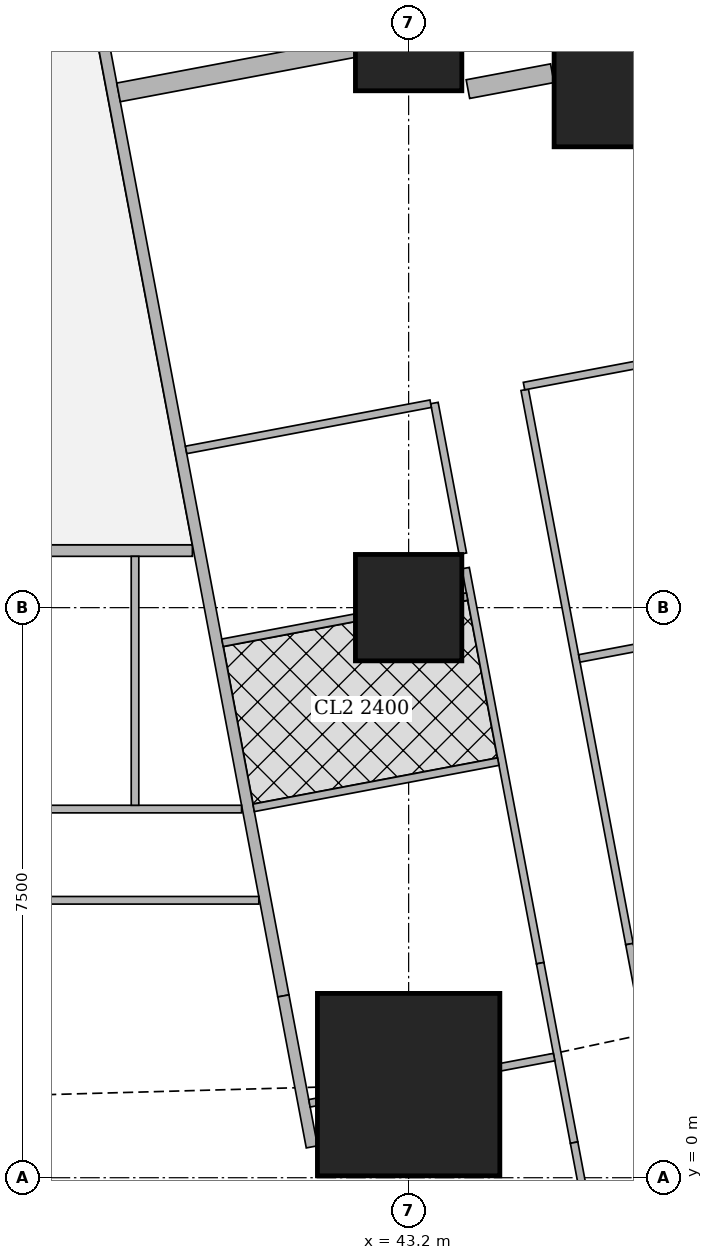
"""IFC4 building model, lengths in metres.
Left out: names, types, materials, properties, quantities, classifications, styles, units other than length and angle.
Written with IfcOpenShell. Run it as: python <this file> out.ifc"""

import sys

from ifc_helpers import new_model, si_unit, direction, frame, frame_2d, origin, origin_2d, place, context, subcontext, project, spatial, rectangle, extrude, element, fill, save


model = new_model("IFC4")
c1 = context("Model", 3, precision=1e-05, world=origin(), true_north=direction((0.0, 1.0)))
c2 = subcontext(c1, "Body", "Model", "MODEL_VIEW")
j1 = project(units=[si_unit("LENGTHUNIT", "METRE"), si_unit("PLANEANGLEUNIT", "RADIAN")], contexts=[c1])
p1 = place(None, origin())
s1 = spatial("IfcSite", under=j1, at=p1, CompositionType="ELEMENT")
p2 = place(p1, origin())
s2 = spatial("IfcBuilding", under=s1, at=p2, CompositionType="ELEMENT")
p3 = place(p2, frame((0.0, 0.0, 234.95)))
s3 = spatial("IfcBuildingStorey", under=s2, at=p3, CompositionType="ELEMENT", Elevation=234.95)
p4 = place(p3, frame((43.2, 1.225, 0.0), z_axis=(0.0, 0.0, 1.0), x_axis=(1.0, 0.0, 0.0)))
e1 = element("IfcColumn", 1, at=p4, inside=s3, PredefinedType="COLUMN", context=c2, shape_type="SweptSolid", body=[
    extrude(rectangle(XDim=2.4, YDim=2.4, at=origin_2d()), origin(), (0.0, 0.0, 1.0), 3.75),
])
for number, where, z_axis, x_axis in (
    (2, (43.2, 7.5, 0.0), (0.0, 0.0, 1.0), (1.0, 0.0, 0.0)),
    (3, (43.2, 15.0, 0.0), (0.0, 0.0, 1.0), (1.0, 0.0, 0.0)),
):
    element("IfcColumn", number, at=place(p3, frame(where, z_axis=z_axis, x_axis=x_axis)), inside=s3, PredefinedType="COLUMN", context=c2, shape_type="SweptSolid", body=[
        extrude(rectangle(XDim=1.4, YDim=1.4, at=origin_2d()), origin(), (0.0, 0.0, 1.0), 3.75),
    ])
p5 = place(p3, frame((46.314, 14.763, 0.0), z_axis=(0.0, 0.0, 1.0), x_axis=(1.0, 0.0, 0.0)))
e4 = element("IfcColumn", 4, at=p5, inside=s3, PredefinedType="COLUMN", context=c2, shape_type="SweptSolid", body=[
    extrude(rectangle(XDim=2.4, YDim=2.4, at=origin_2d()), origin(), (0.0, 0.0, 1.0), 3.75),
])
p6 = place(p3, frame((50.653, 2.703, 0.0), z_axis=(0.0, 0.0, 1.0), x_axis=(-0.185612026696, 0.982623109613, 0.0)))
e5 = element("IfcWall", 5, at=p6, inside=s3, PredefinedType="SOLIDWALL", context=c2, shape_type="SweptSolid", body=[
    extrude(rectangle(XDim=41.393, YDim=0.2, at=frame_2d((20.697, 0.0))), origin(), (0.0, 0.0, 1.0), 3.5),
])
p7 = place(p6, frame((1.633, 0.0, 0.9)))
e6 = element("IfcOpeningElement", 6, at=p7, cuts=e5, PredefinedType="OPENING", context=c2, shape_type="SweptSolid", body=[
    extrude(rectangle(XDim=1.8, YDim=1.5, at=frame_2d((0.9, 0.75))), frame((0.0, 0.11, 0.0), z_axis=(0.0, -1.0, 0.0), x_axis=(1.0, 0.0, 0.0)), (0.0, 0.0, 1.0), 0.22),
])
p8 = place(p6, frame((6.032, 0.0, 0.9)))
e7 = element("IfcOpeningElement", 7, at=p8, cuts=e5, PredefinedType="OPENING", context=c2, shape_type="SweptSolid", body=[
    extrude(rectangle(XDim=1.8, YDim=1.5, at=frame_2d((0.9, 0.75))), frame((0.0, 0.11, 0.0), z_axis=(0.0, -1.0, 0.0), x_axis=(1.0, 0.0, 0.0)), (0.0, 0.0, 1.0), 0.22),
])
p9 = place(p6, frame((9.848, 0.0, 0.9)))
e8 = element("IfcOpeningElement", 8, at=p9, cuts=e5, PredefinedType="OPENING", context=c2, shape_type="SweptSolid", body=[
    extrude(rectangle(XDim=1.8, YDim=1.5, at=frame_2d((0.9, 0.75))), frame((0.0, 0.11, 0.0), z_axis=(0.0, -1.0, 0.0), x_axis=(1.0, 0.0, 0.0)), (0.0, 0.0, 1.0), 0.22),
])
p10 = place(p6, frame((13.664, 0.0, 0.9)))
e9 = element("IfcOpeningElement", 9, at=p10, cuts=e5, PredefinedType="OPENING", context=c2, shape_type="SweptSolid", body=[
    extrude(rectangle(XDim=1.8, YDim=1.5, at=frame_2d((0.9, 0.75))), frame((0.0, 0.11, 0.0), z_axis=(0.0, -1.0, 0.0), x_axis=(1.0, 0.0, 0.0)), (0.0, 0.0, 1.0), 0.22),
])
p11 = place(p6, frame((17.481, 0.0, 0.9)))
e10 = element("IfcOpeningElement", 10, at=p11, cuts=e5, PredefinedType="OPENING", context=c2, shape_type="SweptSolid", body=[
    extrude(rectangle(XDim=1.8, YDim=1.5, at=frame_2d((0.9, 0.75))), frame((0.0, 0.11, 0.0), z_axis=(0.0, -1.0, 0.0), x_axis=(1.0, 0.0, 0.0)), (0.0, 0.0, 1.0), 0.22),
])
p12 = place(p6, frame((21.297, 0.0, 0.9)))
e11 = element("IfcOpeningElement", 11, at=p12, cuts=e5, PredefinedType="OPENING", context=c2, shape_type="SweptSolid", body=[
    extrude(rectangle(XDim=1.8, YDim=1.5, at=frame_2d((0.9, 0.75))), frame((0.0, 0.11, 0.0), z_axis=(0.0, -1.0, 0.0), x_axis=(1.0, 0.0, 0.0)), (0.0, 0.0, 1.0), 0.22),
])
p13 = place(p6, frame((25.113, 0.0, 0.9)))
e12 = element("IfcOpeningElement", 12, at=p13, cuts=e5, PredefinedType="OPENING", context=c2, shape_type="SweptSolid", body=[
    extrude(rectangle(XDim=1.8, YDim=1.5, at=frame_2d((0.9, 0.75))), frame((0.0, 0.11, 0.0), z_axis=(0.0, -1.0, 0.0), x_axis=(1.0, 0.0, 0.0)), (0.0, 0.0, 1.0), 0.22),
])
p14 = place(p6, frame((28.93, 0.0, 0.9)))
e13 = element("IfcOpeningElement", 13, at=p14, cuts=e5, PredefinedType="OPENING", context=c2, shape_type="SweptSolid", body=[
    extrude(rectangle(XDim=1.8, YDim=1.5, at=frame_2d((0.9, 0.75))), frame((0.0, 0.11, 0.0), z_axis=(0.0, -1.0, 0.0), x_axis=(1.0, 0.0, 0.0)), (0.0, 0.0, 1.0), 0.22),
])
p15 = place(p6, frame((32.746, 0.0, 0.9)))
e14 = element("IfcOpeningElement", 14, at=p15, cuts=e5, PredefinedType="OPENING", context=c2, shape_type="SweptSolid", body=[
    extrude(rectangle(XDim=1.8, YDim=1.5, at=frame_2d((0.9, 0.75))), frame((0.0, 0.11, 0.0), z_axis=(0.0, -1.0, 0.0), x_axis=(1.0, 0.0, 0.0)), (0.0, 0.0, 1.0), 0.22),
])
p16 = place(p6, frame((36.481, 0.0, 0.9)))
e15 = element("IfcOpeningElement", 15, at=p16, cuts=e5, PredefinedType="OPENING", context=c2, shape_type="SweptSolid", body=[
    extrude(rectangle(XDim=1.8, YDim=1.5, at=frame_2d((0.9, 0.75))), frame((0.0, 0.11, 0.0), z_axis=(0.0, -1.0, 0.0), x_axis=(1.0, 0.0, 0.0)), (0.0, 0.0, 1.0), 0.22),
])
p17 = place(p3, frame((40.355, 8.25, 0.0), z_axis=(0.0, 0.0, 1.0), x_axis=(-1.0, 0.0, 0.0)))
e16 = element("IfcWall", 16, at=p17, inside=s3, PredefinedType="SOLIDWALL", context=c2, shape_type="SweptSolid", body=[
    extrude(rectangle(XDim=3.654, YDim=0.15, at=frame_2d((1.827, 0.0))), origin(), (0.0, 0.0, 1.0), 3.5),
])
p18 = place(p3, frame((33.933, 42.73, 0.0), z_axis=(0.0, 0.0, 1.0), x_axis=(0.185595417643, -0.982626246825, 0.0)))
e17 = element("IfcWall", 17, at=p18, inside=s3, PredefinedType="SOLIDWALL", context=c2, shape_type="SweptSolid", body=[
    extrude(rectangle(XDim=41.051, YDim=0.15, at=frame_2d((20.525, 0.0))), origin(), (0.0, 0.0, 1.0), 2.5),
])
p19 = place(p18, frame((12.266, 0.0, 0.0)))
e18 = element("IfcOpeningElement", 18, at=p19, cuts=e17, PredefinedType="OPENING", context=c2, shape_type="SweptSolid", body=[
    extrude(rectangle(XDim=1.0, YDim=2.1, at=frame_2d((0.5, 1.05))), frame((0.0, 0.085, 0.0), z_axis=(0.0, -1.0, 0.0), x_axis=(1.0, 0.0, 0.0)), (0.0, 0.0, 1.0), 0.17),
])
p20 = place(p18, frame((16.082, 0.0, 0.0)))
e19 = element("IfcOpeningElement", 19, at=p20, cuts=e17, PredefinedType="OPENING", context=c2, shape_type="SweptSolid", body=[
    extrude(rectangle(XDim=1.0, YDim=2.1, at=frame_2d((0.5, 1.05))), frame((0.0, 0.085, 0.0), z_axis=(0.0, -1.0, 0.0), x_axis=(1.0, 0.0, 0.0)), (0.0, 0.0, 1.0), 0.17),
])
p21 = place(p18, frame((30.862, 0.0, 0.0)))
e20 = element("IfcOpeningElement", 20, at=p21, cuts=e17, PredefinedType="OPENING", context=c2, shape_type="SweptSolid", body=[
    extrude(rectangle(XDim=1.0, YDim=2.1, at=frame_2d((0.5, 1.05))), frame((0.0, 0.085, 0.0), z_axis=(0.0, -1.0, 0.0), x_axis=(1.0, 0.0, 0.0)), (0.0, 0.0, 1.0), 0.17),
])
p22 = place(p3, frame((41.552, 2.392, 0.0), z_axis=(0.0, 0.0, 1.0), x_axis=(0.185535500323, -0.982637561932, 0.0)))
e21 = element("IfcWall", 21, at=p22, inside=s3, PredefinedType="SOLIDWALL", context=c2, shape_type="SweptSolid", body=[
    extrude(rectangle(XDim=2.021, YDim=0.15, at=frame_2d((1.011, 0.0))), origin(), (0.0, 0.0, 1.0), 2.05),
])
p23 = place(p3, frame((41.229, 3.65, 0.0), z_axis=(0.0, 0.0, 1.0), x_axis=(-1.0, 0.0, 0.0)))
e22 = element("IfcWall", 22, at=p23, inside=s3, PredefinedType="PARTITIONING", context=c2, shape_type="SweptSolid", body=[
    extrude(rectangle(XDim=5.229, YDim=0.1, at=frame_2d((2.615, 0.0))), origin(), (0.0, 0.0, 1.0), 3.5),
])
p24 = place(p23, frame((4.129, 0.0, 0.0)))
e23 = element("IfcOpeningElement", 23, at=p24, cuts=e22, PredefinedType="OPENING", context=c2, shape_type="SweptSolid", body=[
    extrude(rectangle(XDim=0.9, YDim=2.1, at=frame_2d((0.45, 1.05))), frame((0.0, 0.06, 0.0), z_axis=(0.0, -1.0, 0.0), x_axis=(1.0, 0.0, 0.0)), (0.0, 0.0, 1.0), 0.12),
])
p25 = place(p3, frame((41.002, 4.85, 0.0), z_axis=(0.0, 0.0, 1.0), x_axis=(-1.0, 0.0, 0.0)))
e24 = element("IfcWall", 24, at=p25, inside=s3, PredefinedType="PARTITIONING", context=c2, shape_type="SweptSolid", body=[
    extrude(rectangle(XDim=5.002, YDim=0.1, at=frame_2d((2.501, 0.0))), origin(), (0.0, 0.0, 1.0), 3.5),
])
p26 = place(p25, frame((3.447, 0.0, 0.0)))
e25 = element("IfcOpeningElement", 25, at=p26, cuts=e24, PredefinedType="OPENING", context=c2, shape_type="SweptSolid", body=[
    extrude(rectangle(XDim=0.9, YDim=2.1, at=frame_2d((0.45, 1.05))), frame((0.0, 0.06, 0.0), z_axis=(0.0, -1.0, 0.0), x_axis=(1.0, 0.0, 0.0)), (0.0, 0.0, 1.0), 0.12),
])
p27 = place(p25, frame((0.15, 0.0, 0.0)))
e26 = element("IfcOpeningElement", 26, at=p27, cuts=e24, PredefinedType="OPENING", context=c2, shape_type="SweptSolid", body=[
    extrude(rectangle(XDim=0.9, YDim=2.1, at=frame_2d((0.45, 1.05))), frame((0.0, 0.06, 0.0), z_axis=(0.0, -1.0, 0.0), x_axis=(1.0, 0.0, 0.0)), (0.0, 0.0, 1.0), 0.12),
])
p28 = place(p25, frame((1.647, 0.0, 0.0)))
e27 = element("IfcOpeningElement", 27, at=p28, cuts=e24, PredefinedType="OPENING", context=c2, shape_type="SweptSolid", body=[
    extrude(rectangle(XDim=0.9, YDim=2.1, at=frame_2d((0.45, 1.05))), frame((0.0, 0.06, 0.0), z_axis=(0.0, -1.0, 0.0), x_axis=(1.0, 0.0, 0.0)), (0.0, 0.0, 1.0), 0.12),
])
p29 = place(p3, frame((39.6, 4.9, 0.0), z_axis=(0.0, 0.0, 1.0), x_axis=(0.0, 1.0, 0.0)))
e28 = element("IfcWall", 28, at=p29, inside=s3, PredefinedType="PARTITIONING", context=c2, shape_type="SweptSolid", body=[
    extrude(rectangle(XDim=3.275, YDim=0.1, at=frame_2d((1.638, 0.0))), origin(), (0.0, 0.0, 1.0), 3.5),
])
p30 = place(p3, frame((44.727, 10.366, 0.0), z_axis=(0.0, 0.0, 1.0), x_axis=(0.185678775129, -0.982610498858, 0.0)))
e29 = element("IfcWall", 29, at=p30, inside=s3, PredefinedType="PARTITIONING", context=c2, shape_type="SweptSolid", body=[
    extrude(rectangle(XDim=7.421, YDim=0.1, at=frame_2d((3.71, 0.0))), origin(), (0.0, 0.0, 1.0), 3.5),
])
p31 = place(p30, frame((0.151, 0.0, 0.0)))
e30 = element("IfcOpeningElement", 30, at=p31, cuts=e29, PredefinedType="OPENING", context=c2, shape_type="SweptSolid", body=[
    extrude(rectangle(XDim=0.9, YDim=2.1, at=frame_2d((0.45, 1.05))), frame((0.0, 0.06, 0.0), z_axis=(0.0, -1.0, 0.0), x_axis=(1.0, 0.0, 0.0)), (0.0, 0.0, 1.0), 0.12),
])
p32 = place(p30, frame((4.65, 0.0, 0.0)))
e31 = element("IfcOpeningElement", 31, at=p32, cuts=e29, PredefinedType="OPENING", context=c2, shape_type="SweptSolid", body=[
    extrude(rectangle(XDim=0.9, YDim=2.1, at=frame_2d((0.45, 1.05))), frame((0.0, 0.06, 0.0), z_axis=(0.0, -1.0, 0.0), x_axis=(1.0, 0.0, 0.0)), (0.0, 0.0, 1.0), 0.12),
])
p33 = place(p3, frame((46.105, 3.074, 0.0), z_axis=(0.0, 0.0, 1.0), x_axis=(0.185631845838, -0.982619365681, 0.0)))
e32 = element("IfcWall", 32, at=p33, inside=s3, PredefinedType="PARTITIONING", context=c2, shape_type="SweptSolid", body=[
    extrude(rectangle(XDim=2.403, YDim=0.1, at=frame_2d((1.201, 0.0))), origin(), (0.0, 0.0, 1.0), 2.05),
])
p34 = place(p3, frame((43.539, 10.192, 0.0), z_axis=(0.0, 0.0, 1.0), x_axis=(0.185443145218, -0.982654995353, 0.0)))
e33 = element("IfcWall", 33, at=p34, inside=s3, PredefinedType="PARTITIONING", context=c2, shape_type="SweptSolid", body=[
    extrude(rectangle(XDim=2.017, YDim=0.1, at=frame_2d((1.008, 0.0))), origin(), (0.0, 0.0, 1.0), 3.5),
])
p35 = place(p3, frame((43.949, 8.02, 0.0), z_axis=(0.0, 0.0, 1.0), x_axis=(0.185656792073, -0.982614652627, 0.0)))
e34 = element("IfcWall", 34, at=p35, inside=s3, PredefinedType="PARTITIONING", context=c2, shape_type="SweptSolid", body=[
    extrude(rectangle(XDim=5.289, YDim=0.1, at=frame_2d((2.645, 0.0))), origin(), (0.0, 0.0, 1.0), 3.5),
])
p36 = place(p35, frame((1.2, 0.0, 0.0)))
e35 = element("IfcOpeningElement", 35, at=p36, cuts=e34, PredefinedType="OPENING", context=c2, shape_type="SweptSolid", body=[
    extrude(rectangle(XDim=0.9, YDim=2.1, at=frame_2d((0.45, 1.05))), frame((0.0, 0.06, 0.0), z_axis=(0.0, -1.0, 0.0), x_axis=(1.0, 0.0, 0.0)), (0.0, 0.0, 1.0), 0.12),
])
p37 = place(p35, frame((2.935, 0.0, 0.0)))
e36 = element("IfcOpeningElement", 36, at=p37, cuts=e34, PredefinedType="OPENING", context=c2, shape_type="SweptSolid", body=[
    extrude(rectangle(XDim=0.9, YDim=2.1, at=frame_2d((0.45, 1.05))), frame((0.0, 0.06, 0.0), z_axis=(0.0, -1.0, 0.0), x_axis=(1.0, 0.0, 0.0)), (0.0, 0.0, 1.0), 0.12),
])
p38 = place(p3, frame((44.931, 2.823, 0.0), z_axis=(0.0, 0.0, 1.0), x_axis=(0.185631845838, -0.982619365681, 0.0)))
e37 = element("IfcWall", 37, at=p38, inside=s3, PredefinedType="PARTITIONING", context=c2, shape_type="SweptSolid", body=[
    extrude(rectangle(XDim=2.403, YDim=0.1, at=frame_2d((1.201, 0.0))), origin(), (0.0, 0.0, 1.0), 2.05),
])
p39 = place(p3, frame((45.377, 0.462, 0.0), z_axis=(0.0, 0.0, 1.0), x_axis=(0.185513480919, -0.982641719243, 0.0)))
e38 = element("IfcWall", 38, at=p39, inside=s3, PredefinedType="PARTITIONING", context=c2, shape_type="SweptSolid", body=[
    extrude(rectangle(XDim=1.095, YDim=0.1, at=frame_2d((0.547, 0.0))), origin(), (0.0, 0.0, 1.0), 3.5),
])
p40 = place(p3, frame((48.943, 11.213, 0.0), z_axis=(0.0, 0.0, 1.0), x_axis=(-0.982633535512, -0.185556823879, 0.0)))
e39 = element("IfcWall", 39, at=p40, inside=s3, PredefinedType="PARTITIONING", context=c2, shape_type="SweptSolid", body=[
    extrude(rectangle(XDim=4.3, YDim=0.1, at=frame_2d((2.15, 0.0))), origin(), (0.0, 0.0, 1.0), 2.05),
])
p41 = place(p3, frame((46.52, 7.035, 0.0), z_axis=(0.0, 0.0, 1.0), x_axis=(-0.982620932907, -0.185623549726, 0.0)))
e40 = element("IfcWall", 40, at=p41, inside=s3, PredefinedType="PARTITIONING", context=c2, shape_type="SweptSolid", body=[
    extrude(rectangle(XDim=1.093, YDim=0.1, at=frame_2d((0.546, 0.0))), origin(), (0.0, 0.0, 1.0), 3.5),
])
p42 = place(p3, frame((43.49, 10.183, 0.0), z_axis=(0.0, 0.0, 1.0), x_axis=(-0.982607026909, -0.185697147715, 0.0)))
e41 = element("IfcWall", 41, at=p42, inside=s3, PredefinedType="PARTITIONING", context=c2, shape_type="SweptSolid", body=[
    extrude(rectangle(XDim=3.275, YDim=0.1, at=frame_2d((1.637, 0.0))), origin(), (0.0, 0.0, 1.0), 3.5),
])
p43 = place(p42, frame((1.2, 0.0, 0.0)))
e42 = element("IfcOpeningElement", 42, at=p43, cuts=e41, PredefinedType="OPENING", context=c2, shape_type="SweptSolid", body=[
    extrude(rectangle(XDim=0.9, YDim=2.1, at=frame_2d((0.45, 1.05))), frame((0.0, 0.06, 0.0), z_axis=(0.0, -1.0, 0.0), x_axis=(1.0, 0.0, 0.0)), (0.0, 0.0, 1.0), 0.12),
])
p44 = place(p3, frame((43.969, 7.646, 0.0), z_axis=(0.0, 0.0, 1.0), x_axis=(-0.983147034646, -0.182816597351, 0.0)))
e43 = element("IfcWall", 43, at=p44, inside=s3, PredefinedType="PARTITIONING", context=c2, shape_type="SweptSolid", body=[
    extrude(rectangle(XDim=0.06, YDim=0.1, at=frame_2d((0.03, 0.0))), origin(), (0.0, 0.0, 1.0), 3.5),
])
p45 = place(p3, frame((42.49, 7.367, 0.0), z_axis=(0.0, 0.0, 1.0), x_axis=(-0.982585223885, -0.185812480215, 0.0)))
e44 = element("IfcWall", 44, at=p45, inside=s3, PredefinedType="PARTITIONING", context=c2, shape_type="SweptSolid", body=[
    extrude(rectangle(XDim=1.77, YDim=0.1, at=frame_2d((0.885, 0.0))), origin(), (0.0, 0.0, 1.0), 3.5),
])
p46 = place(p3, frame((45.114, 1.587, 0.0), z_axis=(0.0, 0.0, 1.0), x_axis=(-0.982671022916, -0.185358195723, 0.0)))
e45 = element("IfcWall", 45, at=p46, inside=s3, PredefinedType="PARTITIONING", context=c2, shape_type="SweptSolid", body=[
    extrude(rectangle(XDim=0.717, YDim=0.1, at=frame_2d((0.358, 0.0))), origin(), (0.0, 0.0, 1.0), 2.05),
])
p47 = place(p3, frame((41.99, 0.997, 0.0), z_axis=(0.0, 0.0, 1.0), x_axis=(-0.982382747416, -0.186880008506, 0.0)))
e46 = element("IfcWall", 46, at=p47, inside=s3, PredefinedType="PARTITIONING", context=c2, shape_type="SweptSolid", body=[
    extrude(rectangle(XDim=0.097, YDim=0.1, at=frame_2d((0.048, 0.0))), origin(), (0.0, 0.0, 1.0), 2.05),
])
p48 = place(p3, frame((44.379, 5.474, 0.0), z_axis=(0.0, 0.0, 1.0), x_axis=(-0.982607026909, -0.185697147715, 0.0)))
e47 = element("IfcWall", 47, at=p48, inside=s3, PredefinedType="PARTITIONING", context=c2, shape_type="SweptSolid", body=[
    extrude(rectangle(XDim=3.275, YDim=0.1, at=frame_2d((1.637, 0.0))), origin(), (0.0, 0.0, 1.0), 3.5),
])
p49 = place(p3, frame((45.09, 14.531, 0.0), z_axis=(0.0, 0.0, 1.0), x_axis=(-0.982737354171, -0.185006196431, 0.0)))
e48 = element("IfcWall", 48, at=p49, inside=s3, PredefinedType="SOLIDWALL", context=c2, shape_type="SweptSolid", body=[
    extrude(rectangle(XDim=1.13, YDim=0.25, at=frame_2d((0.565, 0.0))), origin(), (0.0, 0.0, 1.0), 2.05),
])
p50 = place(p3, frame((42.476, 14.863, 0.0), z_axis=(0.0, 0.0, 1.0), x_axis=(-0.982638716117, -0.185529387398, 0.0)))
e49 = element("IfcWall", 49, at=p50, inside=s3, PredefinedType="SOLIDWALL", context=c2, shape_type="SweptSolid", body=[
    extrude(rectangle(XDim=3.148, YDim=0.25, at=frame_2d((1.574, 0.0))), origin(), (0.0, 0.0, 1.0), 3.5),
])
p51 = place(p27, origin())
e50 = element("IfcDoor", 50, at=p51, inside=s3, OperationType="SINGLE_SWING_RIGHT", PredefinedType="DOOR", context=c2, shape_type="SweptSolid", body=[
    extrude(rectangle(XDim=0.9, YDim=2.1, at=frame_2d((0.45, 1.05))), frame((0.0, 0.025, 0.0), z_axis=(0.0, -1.0, 0.0), x_axis=(1.0, 0.0, 0.0)), (0.0, 0.0, 1.0), 0.05),
])
fill(e26, e50)
p52 = place(p28, origin())
e51 = element("IfcDoor", 51, at=p52, inside=s3, OperationType="SINGLE_SWING_LEFT", PredefinedType="DOOR", context=c2, shape_type="SweptSolid", body=[
    extrude(rectangle(XDim=0.9, YDim=2.1, at=frame_2d((0.45, 1.05))), frame((0.0, 0.025, 0.0), z_axis=(0.0, -1.0, 0.0), x_axis=(1.0, 0.0, 0.0)), (0.0, 0.0, 1.0), 0.05),
])
fill(e27, e51)
p53 = place(p31, origin())
e52 = element("IfcDoor", 52, at=p53, inside=s3, OperationType="SINGLE_SWING_LEFT", PredefinedType="DOOR", context=c2, shape_type="SweptSolid", body=[
    extrude(rectangle(XDim=0.9, YDim=2.1, at=frame_2d((0.45, 1.05))), frame((0.0, 0.025, 0.0), z_axis=(0.0, -1.0, 0.0), x_axis=(1.0, 0.0, 0.0)), (0.0, 0.0, 1.0), 0.05),
])
fill(e30, e52)
p54 = place(p32, origin())
e53 = element("IfcDoor", 53, at=p54, inside=s3, OperationType="SINGLE_SWING_LEFT", PredefinedType="DOOR", context=c2, shape_type="SweptSolid", body=[
    extrude(rectangle(XDim=0.9, YDim=2.1, at=frame_2d((0.45, 1.05))), frame((0.0, 0.025, 0.0), z_axis=(0.0, -1.0, 0.0), x_axis=(1.0, 0.0, 0.0)), (0.0, 0.0, 1.0), 0.05),
])
fill(e31, e53)
p55 = place(p36, origin())
e54 = element("IfcDoor", 54, at=p55, inside=s3, OperationType="SINGLE_SWING_LEFT", PredefinedType="DOOR", context=c2, shape_type="SweptSolid", body=[
    extrude(rectangle(XDim=0.9, YDim=2.1, at=frame_2d((0.45, 1.05))), frame((0.0, 0.025, 0.0), z_axis=(0.0, -1.0, 0.0), x_axis=(1.0, 0.0, 0.0)), (0.0, 0.0, 1.0), 0.05),
])
fill(e35, e54)
p56 = place(p37, origin())
e55 = element("IfcDoor", 55, at=p56, inside=s3, OperationType="SINGLE_SWING_RIGHT", PredefinedType="DOOR", context=c2, shape_type="SweptSolid", body=[
    extrude(rectangle(XDim=0.9, YDim=2.1, at=frame_2d((0.45, 1.05))), frame((0.0, 0.025, 0.0), z_axis=(0.0, -1.0, 0.0), x_axis=(1.0, 0.0, 0.0)), (0.0, 0.0, 1.0), 0.05),
])
fill(e36, e55)
p57 = place(p21, origin())
e56 = element("IfcDoor", 56, at=p57, inside=s3, OperationType="SINGLE_SWING_LEFT", PredefinedType="DOOR", context=c2, shape_type="SweptSolid", body=[
    extrude(rectangle(XDim=1.0, YDim=2.1, at=frame_2d((0.5, 1.05))), frame((0.0, 0.025, 0.0), z_axis=(0.0, -1.0, 0.0), x_axis=(1.0, 0.0, 0.0)), (0.0, 0.0, 1.0), 0.05),
])
fill(e20, e56)
p58 = place(p43, origin())
e57 = element("IfcDoor", 57, at=p58, inside=s3, OperationType="SINGLE_SWING_RIGHT", PredefinedType="DOOR", context=c2, shape_type="SweptSolid", body=[
    extrude(rectangle(XDim=0.9, YDim=2.1, at=frame_2d((0.45, 1.05))), frame((0.0, 0.025, 0.0), z_axis=(0.0, -1.0, 0.0), x_axis=(1.0, 0.0, 0.0)), (0.0, 0.0, 1.0), 0.05),
])
fill(e42, e57)
save(model, sys.argv[1])
